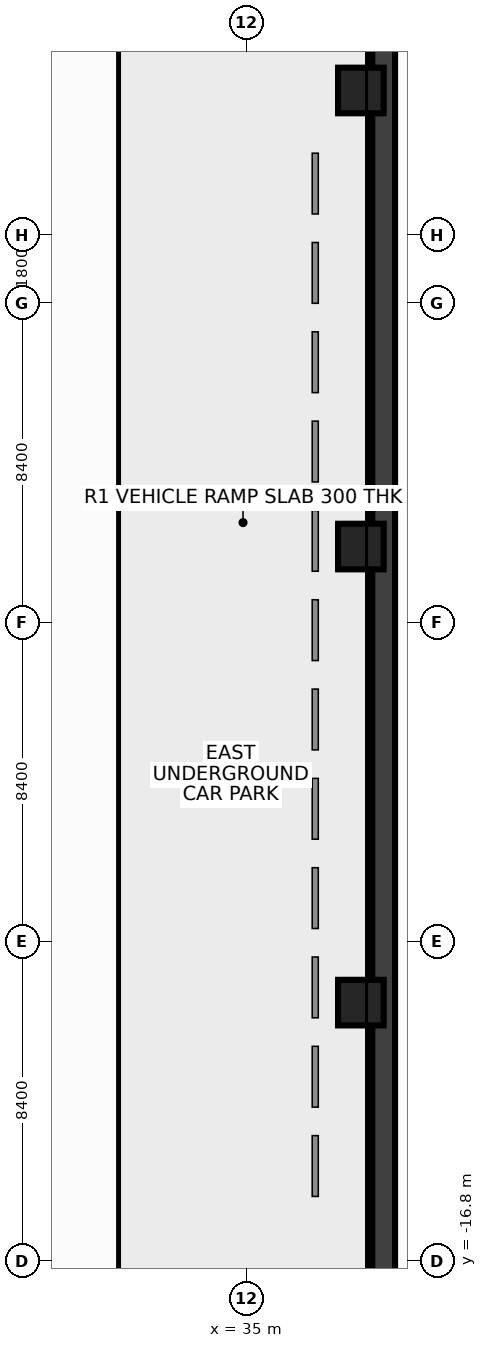
"""IFC4 building model, lengths in metres.
Left out: names, types, materials, properties, quantities, classifications, styles, units other than length and angle.
Written with IfcOpenShell. Run it as: python <this file> out.ifc"""

import sys

from ifc_helpers import new_model, si_unit, direction, frame, frame_2d, origin, origin_2d, place, context, subcontext, project, spatial, rectangle, hollow_rectangle, extrude, source, transform, mapped, element, save


model = new_model("IFC4")
c1 = context("Model", 3, precision=1e-05, world=origin(), true_north=direction((0.0, 1.0)))
c2 = subcontext(c1, "Body", "Model", "MODEL_VIEW")
j1 = project(units=[si_unit("LENGTHUNIT", "METRE"), si_unit("PLANEANGLEUNIT", "RADIAN")], contexts=[c1])
p1 = place(None, origin())
s1 = spatial("IfcSite", under=j1, at=p1, CompositionType="ELEMENT")
p2 = place(p1, origin())
s2 = spatial("IfcBuilding", under=s1, at=p2, CompositionType="ELEMENT")
p3 = place(p2, frame((0.0, 0.0, -11.0)))
s3 = spatial("IfcBuildingStorey", under=s2, at=p3, CompositionType="ELEMENT", Elevation=-11.0)
m1 = source(origin(), c2, "Body", "SweptSolid", [
    extrude(rectangle(XDim=48.8, YDim=0.6, at=frame_2d((24.4, 0.0))), origin(), (0.0, 0.0, 1.0), 5.5),
])
p4 = place(p3, frame((38.6, -25.3, 0.0), z_axis=(0.0, 0.0, 1.0), x_axis=(0.0, 1.0, 0.0)))
e1 = element("IfcWall", 1, at=p4, inside=s3, PredefinedType="SHEAR", context=c2, shape_type="MappedRepresentation", body=[
    mapped(m1, transform((0.0, 0.0, 0.0), x_axis=(1.0, 0.0, 0.0), y_axis=(0.0, 1.0, 0.0), z_axis=(0.0, 0.0, 1.0), scale=1.0)),
])
m2 = source(origin(), c2, "Body", "SweptSolid", [
    extrude(hollow_rectangle(XDim=1.2, YDim=1.2, WallThickness=0.055, at=origin_2d()), origin(), (0.0, 0.0, 1.0), 5.5),
])
for number, where, z_axis, x_axis in (
    (2, (38.0, -10.0, 0.0), (0.0, 0.0, 1.0), (1.0, 0.0, 0.0)),
    (3, (38.0, 2.0, 0.0), (0.0, 0.0, 1.0), (1.0, 0.0, 0.0)),
    (4, (38.0, 14.0, 0.0), (0.0, 0.0, 1.0), (1.0, 0.0, 0.0)),
):
    element("IfcColumn", number, at=place(p3, frame(where, z_axis=z_axis, x_axis=x_axis)), inside=s3, PredefinedType="COLUMN", context=c2, shape_type="MappedRepresentation", body=[
        mapped(m2, transform((0.0, 0.0, 0.0), x_axis=(1.0, 0.0, 0.0), y_axis=(0.0, 1.0, 0.0), z_axis=(0.0, 0.0, 1.0), scale=1.0)),
    ])
save(model, sys.argv[1])
